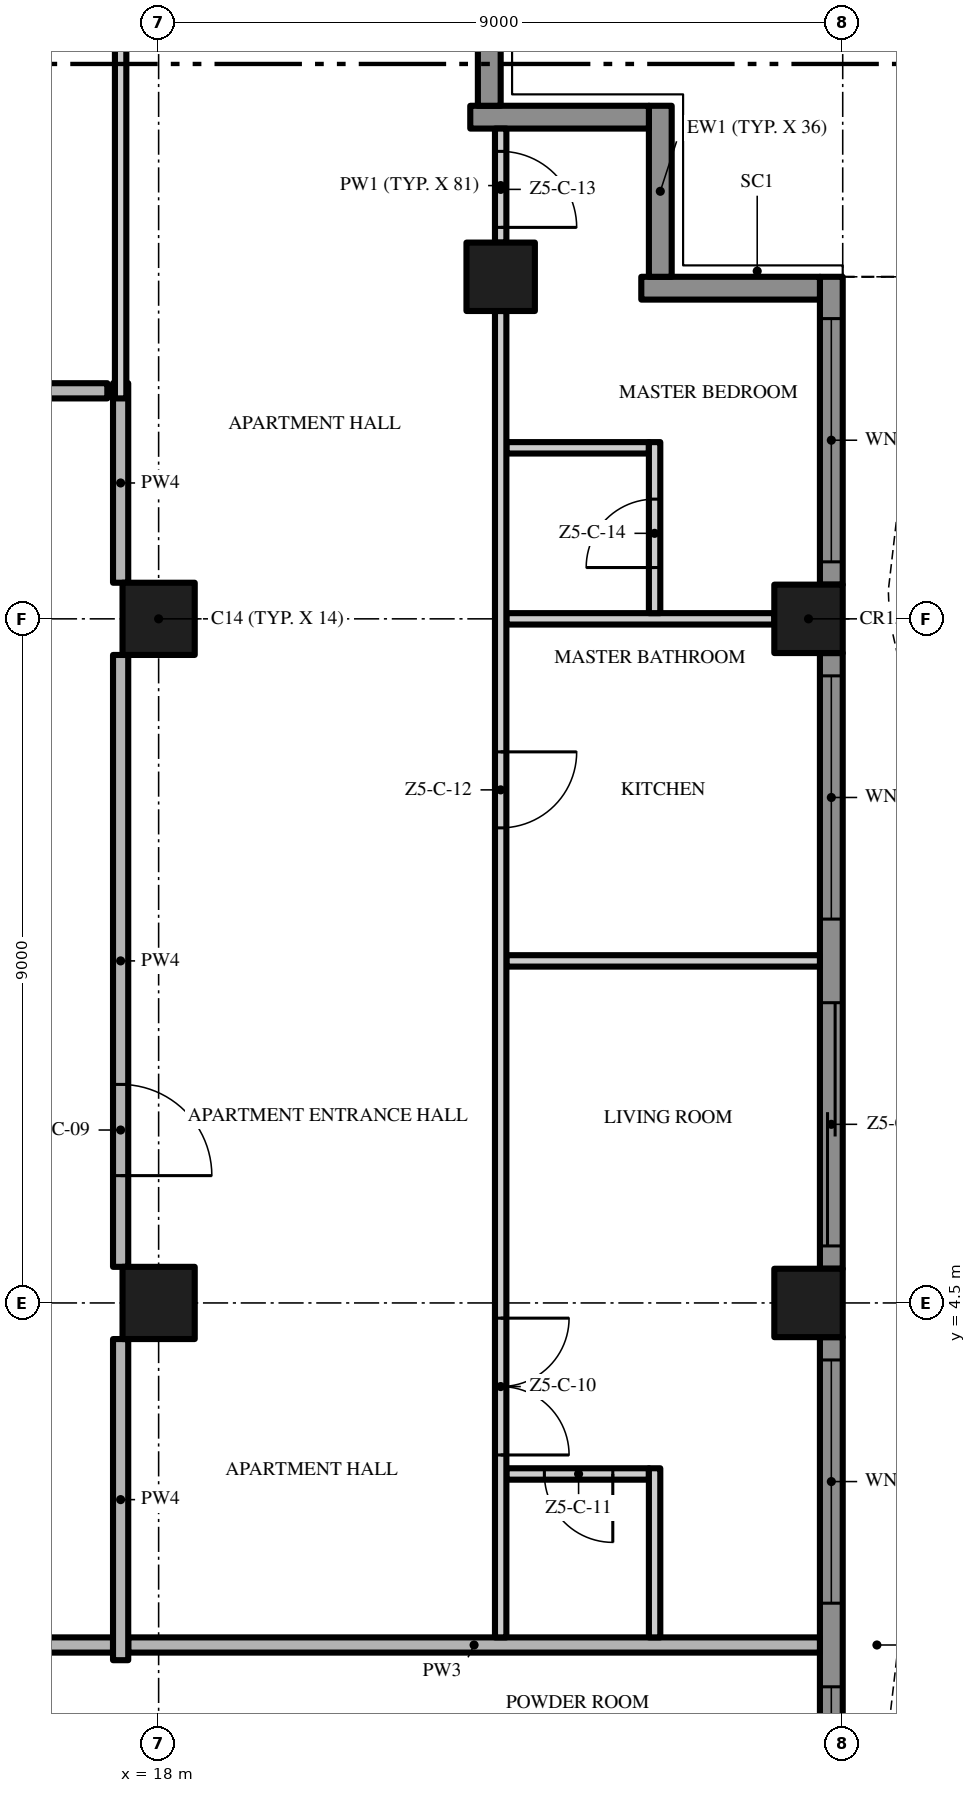
"""IFC4 building model, lengths in metres.
Left out: names, types, materials, properties, quantities, classifications, styles, units other than length and angle.
Written with IfcOpenShell. Run it as: python <this file> out.ifc"""

import sys

from ifc_helpers import new_model, si_unit, direction, frame, frame_2d, origin, origin_2d, place, context, subcontext, project, spatial, polyline, rectangle, outline, extrude, element, fill, save


model = new_model("IFC4")
c1 = context("Model", 3, precision=1e-05, world=origin(), true_north=direction((0.0, 1.0)))
c2 = subcontext(c1, "Body", "Model", "MODEL_VIEW")
j1 = project(units=[si_unit("LENGTHUNIT", "METRE"), si_unit("PLANEANGLEUNIT", "RADIAN")], contexts=[c1])
p1 = place(None, origin())
s1 = spatial("IfcSite", under=j1, at=p1, CompositionType="ELEMENT")
p2 = place(p1, origin())
s2 = spatial("IfcBuilding", under=s1, at=p2, CompositionType="ELEMENT")
p3 = place(p2, frame((0.0, 0.0, 261.6)))
s3 = spatial("IfcBuildingStorey", under=s2, at=p3, CompositionType="ELEMENT", Elevation=261.6)
for number, where, z_axis, x_axis in (
    (1, (18.0, 13.5, 0.0), (0.0, 0.0, 1.0), (1.0, 0.0, 0.0)),
    (2, (18.0, 4.5, 0.0), (0.0, 0.0, 1.0), (1.0, 0.0, 0.0)),
):
    element("IfcColumn", number, at=place(p3, frame(where, z_axis=z_axis, x_axis=x_axis)), inside=s3, PredefinedType="COLUMN", context=c2, shape_type="SweptSolid", body=[
        extrude(rectangle(XDim=0.95, YDim=0.95, at=origin_2d()), origin(), (0.0, 0.0, 1.0), 3.5),
    ])
for number, where, z_axis, x_axis in (
    (3, (26.55, 13.5, 0.0), (0.0, 0.0, 1.0), (1.0, 0.0, 0.0)),
    (4, (22.5, 18.0, 0.0), (0.0, 0.0, 1.0), (1.0, 0.0, 0.0)),
    (5, (26.55, 4.5, 0.0), (0.0, 0.0, 1.0), (1.0, 0.0, 0.0)),
):
    element("IfcColumn", number, at=place(p3, frame(where, z_axis=z_axis, x_axis=x_axis)), inside=s3, PredefinedType="COLUMN", context=c2, shape_type="SweptSolid", body=[
        extrude(rectangle(XDim=0.9, YDim=0.9, at=origin_2d()), origin(), (0.0, 0.0, 1.0), 3.5),
    ])
p4 = place(p3, frame((26.85, 4.05, 0.0), z_axis=(0.0, 0.0, 1.0), x_axis=(0.0, -1.0, 0.0)))
e6 = element("IfcWall", 6, at=p4, inside=s3, PredefinedType="SOLIDWALL", context=c2, shape_type="SweptSolid", body=[
    extrude(rectangle(XDim=8.1, YDim=0.3, at=frame_2d((4.05, 0.0))), origin(), (0.0, 0.0, 1.0), 3.5),
])
p5 = place(p4, frame((4.6, 0.0, 0.45)))
e7 = element("IfcOpeningElement", 7, at=p5, cuts=e6, PredefinedType="OPENING", context=c2, shape_type="SweptSolid", body=[
    extrude(rectangle(XDim=3.2, YDim=2.65, at=frame_2d((1.6, 1.325))), frame((0.0, 0.16, 0.0), z_axis=(0.0, -1.0, 0.0), x_axis=(1.0, 0.0, 0.0)), (0.0, 0.0, 1.0), 0.32),
])
p6 = place(p4, frame((0.3, 0.0, 0.45)))
e8 = element("IfcOpeningElement", 8, at=p6, cuts=e6, PredefinedType="OPENING", context=c2, shape_type="SweptSolid", body=[
    extrude(rectangle(XDim=3.2, YDim=2.65, at=frame_2d((1.6, 1.325))), frame((0.0, 0.16, 0.0), z_axis=(0.0, -1.0, 0.0), x_axis=(1.0, 0.0, 0.0)), (0.0, 0.0, 1.0), 0.32),
])
p7 = place(p3, frame((26.85, 13.05, 0.0), z_axis=(0.0, 0.0, 1.0), x_axis=(0.0, -1.0, 0.0)))
e9 = element("IfcWall", 9, at=p7, inside=s3, PredefinedType="SOLIDWALL", context=c2, shape_type="SweptSolid", body=[
    extrude(rectangle(XDim=8.1, YDim=0.3, at=frame_2d((4.05, 0.0))), origin(), (0.0, 0.0, 1.0), 3.5),
])
p8 = place(p7, frame((4.6, 0.0, 0.0)))
e10 = element("IfcOpeningElement", 10, at=p8, cuts=e9, PredefinedType="OPENING", context=c2, shape_type="SweptSolid", body=[
    extrude(rectangle(XDim=3.2, YDim=2.4, at=frame_2d((1.6, 1.2))), frame((0.0, 0.16, 0.0), z_axis=(0.0, -1.0, 0.0), x_axis=(1.0, 0.0, 0.0)), (0.0, 0.0, 1.0), 0.32),
])
p9 = place(p7, frame((0.3, 0.0, 0.45)))
e11 = element("IfcOpeningElement", 11, at=p9, cuts=e9, PredefinedType="OPENING", context=c2, shape_type="SweptSolid", body=[
    extrude(rectangle(XDim=3.2, YDim=2.65, at=frame_2d((1.6, 1.325))), frame((0.0, 0.16, 0.0), z_axis=(0.0, -1.0, 0.0), x_axis=(1.0, 0.0, 0.0)), (0.0, 0.0, 1.0), 0.32),
])
p10 = place(p3, frame((26.85, 18.0, 0.0), z_axis=(0.0, 0.0, 1.0), x_axis=(0.0, -1.0, 0.0)))
e12 = element("IfcWall", 12, at=p10, inside=s3, PredefinedType="SOLIDWALL", context=c2, shape_type="SweptSolid", body=[
    extrude(rectangle(XDim=4.05, YDim=0.3, at=frame_2d((2.025, 0.0))), origin(), (0.0, 0.0, 1.0), 3.5),
])
p11 = place(p10, frame((0.55, 0.0, 0.45)))
e13 = element("IfcOpeningElement", 13, at=p11, cuts=e12, PredefinedType="OPENING", context=c2, shape_type="SweptSolid", body=[
    extrude(rectangle(XDim=3.2, YDim=2.65, at=frame_2d((1.6, 1.325))), frame((0.0, 0.16, 0.0), z_axis=(0.0, -1.0, 0.0), x_axis=(1.0, 0.0, 0.0)), (0.0, 0.0, 1.0), 0.32),
])
p12 = place(p3, frame((24.35, 17.85, 0.0), z_axis=(0.0, 0.0, 1.0), x_axis=(1.0, 0.0, 0.0)))
e14 = element("IfcWall", 14, at=p12, inside=s3, PredefinedType="SOLIDWALL", context=c2, shape_type="SweptSolid", body=[
    extrude(rectangle(XDim=2.35, YDim=0.3, at=frame_2d((1.175, 0.0))), origin(), (0.0, 0.0, 1.0), 3.5),
])
p13 = place(p3, frame((24.6, 20.25, 0.0), z_axis=(0.0, 0.0, 1.0), x_axis=(0.0, -1.0, 0.0)))
e15 = element("IfcWall", 15, at=p13, inside=s3, PredefinedType="SOLIDWALL", context=c2, shape_type="SweptSolid", body=[
    extrude(rectangle(XDim=2.25, YDim=0.3, at=frame_2d((1.125, 0.0))), origin(), (0.0, 0.0, 1.0), 3.5),
])
p14 = place(p3, frame((22.1, 20.1, 0.0), z_axis=(0.0, 0.0, 1.0), x_axis=(1.0, 0.0, 0.0)))
e16 = element("IfcWall", 16, at=p14, inside=s3, PredefinedType="SOLIDWALL", context=c2, shape_type="SweptSolid", body=[
    extrude(rectangle(XDim=2.35, YDim=0.3, at=frame_2d((1.175, 0.0))), origin(), (0.0, 0.0, 1.0), 3.5),
])
p15 = place(p3, frame((22.35, 22.5, 0.0), z_axis=(0.0, 0.0, 1.0), x_axis=(0.0, -1.0, 0.0)))
e17 = element("IfcWall", 17, at=p15, inside=s3, PredefinedType="SOLIDWALL", context=c2, shape_type="SweptSolid", body=[
    extrude(rectangle(XDim=2.25, YDim=0.3, at=frame_2d((1.125, 0.0))), origin(), (0.0, 0.0, 1.0), 3.5),
])
p16 = place(p3, origin())
e18 = element("IfcWall", 18, at=p16, inside=s3, PredefinedType="USERDEFINED", context=c2, shape_type="SweptSolid", body=[
    extrude(outline(polyline([(27.951, -18.0), (27.615, -16.5), (27.6, -16.125), (27.731, -15.0), (28.255, -13.5), (28.988, -12.0), (29.649, -10.5), (29.985, -9.0), (30.0, -8.625), (29.869, -7.5), (29.345, -6.0), (28.612, -4.5), (27.951, -3.0), (27.615, -1.5), (27.6, -1.125), (27.731, 0.0), (28.255, 1.5), (28.988, 3.0), (29.649, 4.5), (29.985, 6.0), (30.0, 6.375), (29.869, 7.5), (29.345, 9.0), (28.612, 10.5), (27.951, 12.0), (27.615, 13.5), (27.6, 13.875), (27.731, 15.0), (28.255, 16.5), (28.988, 18.0), (28.763, 18.11), (28.024, 16.596), (27.486, 15.056), (27.349, 13.885), (27.366, 13.467), (27.713, 11.921), (28.385, 10.395), (29.114, 8.904), (29.624, 7.444), (29.749, 6.365), (29.736, 6.033), (29.41, 4.579), (28.761, 3.105), (28.024, 1.596), (27.486, 0.056), (27.349, -1.115), (27.366, -1.533), (27.713, -3.079), (28.385, -4.605), (29.114, -6.096), (29.624, -7.556), (29.749, -8.635), (29.736, -8.967), (29.41, -10.421), (28.761, -11.895), (28.024, -13.404), (27.486, -14.944), (27.349, -16.115), (27.366, -16.533), (27.708, -18.055), (27.951, -18.0)])), origin(), (0.0, 0.0, 1.0), 0.9),
])
p17 = place(p3, frame((17.4, 0.0, 0.0), z_axis=(0.0, 0.0, 1.0), x_axis=(-1.0, 0.0, 0.0)))
e19 = element("IfcWall", 19, at=p17, inside=s3, PredefinedType="PARTITIONING", context=c2, shape_type="SweptSolid", body=[
    extrude(rectangle(XDim=34.8, YDim=0.2, at=frame_2d((17.4, 0.0))), origin(), (0.0, 0.0, 1.0), 3.5),
])
p18 = place(p17, frame((23.4, 0.0, 0.0)))
e20 = element("IfcOpeningElement", 20, at=p18, cuts=e19, PredefinedType="OPENING", context=c2, shape_type="SweptSolid", body=[
    extrude(rectangle(XDim=1.5, YDim=2.4, at=frame_2d((0.75, 1.2))), frame((0.0, 0.11, 0.0), z_axis=(0.0, -1.0, 0.0), x_axis=(1.0, 0.0, 0.0)), (0.0, 0.0, 1.0), 0.22),
])
p19 = place(p17, frame((5.4, 0.0, 0.0)))
e21 = element("IfcOpeningElement", 21, at=p19, cuts=e19, PredefinedType="OPENING", context=c2, shape_type="SweptSolid", body=[
    extrude(rectangle(XDim=1.5, YDim=2.4, at=frame_2d((0.75, 1.2))), frame((0.0, 0.11, 0.0), z_axis=(0.0, -1.0, 0.0), x_axis=(1.0, 0.0, 0.0)), (0.0, 0.0, 1.0), 0.22),
])
p20 = place(p3, frame((17.6, 0.0, 0.0), z_axis=(0.0, 0.0, 1.0), x_axis=(1.0, 0.0, 0.0)))
e22 = element("IfcWall", 22, at=p20, inside=s3, PredefinedType="PARTITIONING", context=c2, shape_type="SweptSolid", body=[
    extrude(rectangle(XDim=9.1, YDim=0.2, at=frame_2d((4.55, 0.0))), origin(), (0.0, 0.0, 1.0), 3.5),
])
p21 = place(p3, frame((24.45, 2.25, 0.0), z_axis=(0.0, 0.0, 1.0), x_axis=(-1.0, 0.0, 0.0)))
e23 = element("IfcWall", 23, at=p21, inside=s3, PredefinedType="PARTITIONING", context=c2, shape_type="SweptSolid", body=[
    extrude(rectangle(XDim=1.875, YDim=0.15, at=frame_2d((0.938, 0.0))), origin(), (0.0, 0.0, 1.0), 3.5),
])
p22 = place(p21, frame((0.475, 0.0, 0.0)))
e24 = element("IfcOpeningElement", 24, at=p22, cuts=e23, PredefinedType="OPENING", context=c2, shape_type="SweptSolid", body=[
    extrude(rectangle(XDim=0.9, YDim=2.1, at=frame_2d((0.45, 1.05))), frame((0.0, 0.085, 0.0), z_axis=(0.0, -1.0, 0.0), x_axis=(1.0, 0.0, 0.0)), (0.0, 0.0, 1.0), 0.17),
])
p23 = place(p3, frame((22.575, 9.0, 0.0), z_axis=(0.0, 0.0, 1.0), x_axis=(1.0, 0.0, 0.0)))
e25 = element("IfcWall", 25, at=p23, inside=s3, PredefinedType="PARTITIONING", context=c2, shape_type="SweptSolid", body=[
    extrude(rectangle(XDim=4.125, YDim=0.15, at=frame_2d((2.062, 0.0))), origin(), (0.0, 0.0, 1.0), 3.5),
])
p24 = place(p3, frame((22.575, 13.5, 0.0), z_axis=(0.0, 0.0, 1.0), x_axis=(1.0, 0.0, 0.0)))
e26 = element("IfcWall", 26, at=p24, inside=s3, PredefinedType="PARTITIONING", context=c2, shape_type="SweptSolid", body=[
    extrude(rectangle(XDim=3.525, YDim=0.15, at=frame_2d((1.762, 0.0))), origin(), (0.0, 0.0, 1.0), 3.5),
])
p25 = place(p3, frame((22.575, 15.75, 0.0), z_axis=(0.0, 0.0, 1.0), x_axis=(1.0, 0.0, 0.0)))
e27 = element("IfcWall", 27, at=p25, inside=s3, PredefinedType="PARTITIONING", context=c2, shape_type="SweptSolid", body=[
    extrude(rectangle(XDim=1.875, YDim=0.15, at=frame_2d((0.938, 0.0))), origin(), (0.0, 0.0, 1.0), 3.5),
])
p26 = place(p3, frame((13.5, 16.5, 0.0), z_axis=(0.0, 0.0, 1.0), x_axis=(1.0, 0.0, 0.0)))
e28 = element("IfcWall", 28, at=p26, inside=s3, PredefinedType="PARTITIONING", context=c2, shape_type="SweptSolid", body=[
    extrude(rectangle(XDim=3.825, YDim=0.2, at=frame_2d((1.913, 0.0))), origin(), (0.0, 0.0, 1.0), 3.5),
])
p27 = place(p26, frame((1.55, 0.0, 0.0)))
e29 = element("IfcOpeningElement", 29, at=p27, cuts=e28, PredefinedType="OPENING", context=c2, shape_type="SweptSolid", body=[
    extrude(rectangle(XDim=0.9, YDim=2.1, at=frame_2d((0.45, 1.05))), frame((0.0, 0.11, 0.0), z_axis=(0.0, -1.0, 0.0), x_axis=(1.0, 0.0, 0.0)), (0.0, 0.0, 1.0), 0.22),
])
p28 = place(p3, frame((17.5, -0.2, 0.0), z_axis=(0.0, 0.0, 1.0), x_axis=(0.0, 1.0, 0.0)))
e30 = element("IfcWall", 30, at=p28, inside=s3, PredefinedType="PARTITIONING", context=c2, shape_type="SweptSolid", body=[
    extrude(rectangle(XDim=4.225, YDim=0.2, at=frame_2d((2.112, 0.0))), origin(), (0.0, 0.0, 1.0), 3.5),
])
p29 = place(p3, frame((17.5, 13.025, 0.0), z_axis=(0.0, 0.0, 1.0), x_axis=(0.0, -1.0, 0.0)))
e31 = element("IfcWall", 31, at=p29, inside=s3, PredefinedType="PARTITIONING", context=c2, shape_type="SweptSolid", body=[
    extrude(rectangle(XDim=8.05, YDim=0.2, at=frame_2d((4.025, 0.0))), origin(), (0.0, 0.0, 1.0), 3.5),
])
p30 = place(p29, frame((5.65, 0.0, 0.0)))
e32 = element("IfcOpeningElement", 32, at=p30, cuts=e31, PredefinedType="OPENING", context=c2, shape_type="SweptSolid", body=[
    extrude(rectangle(XDim=1.2, YDim=2.4, at=frame_2d((0.6, 1.2))), frame((0.0, 0.11, 0.0), z_axis=(0.0, -1.0, 0.0), x_axis=(1.0, 0.0, 0.0)), (0.0, 0.0, 1.0), 0.22),
])
p31 = place(p3, frame((17.5, 13.975, 0.0), z_axis=(0.0, 0.0, 1.0), x_axis=(0.0, 1.0, 0.0)))
e33 = element("IfcWall", 33, at=p31, inside=s3, PredefinedType="PARTITIONING", context=c2, shape_type="SweptSolid", body=[
    extrude(rectangle(XDim=2.625, YDim=0.2, at=frame_2d((1.312, 0.0))), origin(), (0.0, 0.0, 1.0), 3.5),
])
p32 = place(p3, frame((17.5, 16.4, 0.0), z_axis=(0.0, 0.0, 1.0), x_axis=(0.0, 1.0, 0.0)))
e34 = element("IfcWall", 34, at=p32, inside=s3, PredefinedType="PARTITIONING", context=c2, shape_type="SweptSolid", body=[
    extrude(rectangle(XDim=5.2, YDim=0.15, at=frame_2d((2.6, 0.0))), origin(), (0.0, 0.0, 1.0), 3.5),
])
p33 = place(p3, frame((22.5, 17.55, 0.0), z_axis=(0.0, 0.0, 1.0), x_axis=(0.0, -1.0, 0.0)))
e35 = element("IfcWall", 35, at=p33, inside=s3, PredefinedType="PARTITIONING", context=c2, shape_type="SweptSolid", body=[
    extrude(rectangle(XDim=17.45, YDim=0.15, at=frame_2d((8.725, 0.0))), origin(), (0.0, 0.0, 1.0), 3.5),
])
p34 = place(p33, frame((13.25, 0.0, 0.0)))
e36 = element("IfcOpeningElement", 36, at=p34, cuts=e35, PredefinedType="OPENING", context=c2, shape_type="SweptSolid", body=[
    extrude(rectangle(XDim=1.8, YDim=2.4, at=frame_2d((0.9, 1.2))), frame((0.0, 0.085, 0.0), z_axis=(0.0, -1.0, 0.0), x_axis=(1.0, 0.0, 0.0)), (0.0, 0.0, 1.0), 0.17),
])
p35 = place(p33, frame((5.8, 0.0, 0.0)))
e37 = element("IfcOpeningElement", 37, at=p35, cuts=e35, PredefinedType="OPENING", context=c2, shape_type="SweptSolid", body=[
    extrude(rectangle(XDim=1.0, YDim=2.4, at=frame_2d((0.5, 1.2))), frame((0.0, 0.085, 0.0), z_axis=(0.0, -1.0, 0.0), x_axis=(1.0, 0.0, 0.0)), (0.0, 0.0, 1.0), 0.17),
])
p36 = place(p3, frame((22.5, 19.95, 0.0), z_axis=(0.0, 0.0, 1.0), x_axis=(0.0, -1.0, 0.0)))
e38 = element("IfcWall", 38, at=p36, inside=s3, PredefinedType="PARTITIONING", context=c2, shape_type="SweptSolid", body=[
    extrude(rectangle(XDim=1.5, YDim=0.15, at=frame_2d((0.75, 0.0))), origin(), (0.0, 0.0, 1.0), 3.5),
])
p37 = place(p36, frame((0.3, 0.0, 0.0)))
e39 = element("IfcOpeningElement", 39, at=p37, cuts=e38, PredefinedType="OPENING", context=c2, shape_type="SweptSolid", body=[
    extrude(rectangle(XDim=1.0, YDim=2.4, at=frame_2d((0.5, 1.2))), frame((0.0, 0.085, 0.0), z_axis=(0.0, -1.0, 0.0), x_axis=(1.0, 0.0, 0.0)), (0.0, 0.0, 1.0), 0.17),
])
p38 = place(p3, frame((24.525, 0.1, 0.0), z_axis=(0.0, 0.0, 1.0), x_axis=(0.0, 1.0, 0.0)))
e40 = element("IfcWall", 40, at=p38, inside=s3, PredefinedType="PARTITIONING", context=c2, shape_type="SweptSolid", body=[
    extrude(rectangle(XDim=2.225, YDim=0.15, at=frame_2d((1.113, 0.0))), origin(), (0.0, 0.0, 1.0), 3.5),
])
p39 = place(p3, frame((24.525, 13.575, 0.0), z_axis=(0.0, 0.0, 1.0), x_axis=(0.0, 1.0, 0.0)))
e41 = element("IfcWall", 41, at=p39, inside=s3, PredefinedType="PARTITIONING", context=c2, shape_type="SweptSolid", body=[
    extrude(rectangle(XDim=2.25, YDim=0.15, at=frame_2d((1.125, 0.0))), origin(), (0.0, 0.0, 1.0), 3.5),
])
p40 = place(p39, frame((0.6, 0.0, 0.0)))
e42 = element("IfcOpeningElement", 42, at=p40, cuts=e41, PredefinedType="OPENING", context=c2, shape_type="SweptSolid", body=[
    extrude(rectangle(XDim=0.9, YDim=2.1, at=frame_2d((0.45, 1.05))), frame((0.0, 0.085, 0.0), z_axis=(0.0, -1.0, 0.0), x_axis=(1.0, 0.0, 0.0)), (0.0, 0.0, 1.0), 0.17),
])
p41 = place(p5, origin())
e43 = element("IfcWindow", 43, at=p41, inside=s3, PartitioningType="SINGLE_PANEL", PredefinedType="WINDOW", context=c2, shape_type="SweptSolid", body=[
    extrude(rectangle(XDim=3.2, YDim=2.65, at=frame_2d((1.6, 1.325))), frame((0.0, 0.03, 0.0), z_axis=(0.0, -1.0, 0.0), x_axis=(1.0, 0.0, 0.0)), (0.0, 0.0, 1.0), 0.06),
])
fill(e7, e43)
p42 = place(p6, origin())
e44 = element("IfcWindow", 44, at=p42, inside=s3, PartitioningType="SINGLE_PANEL", PredefinedType="WINDOW", context=c2, shape_type="SweptSolid", body=[
    extrude(rectangle(XDim=3.2, YDim=2.65, at=frame_2d((1.6, 1.325))), frame((0.0, 0.03, 0.0), z_axis=(0.0, -1.0, 0.0), x_axis=(1.0, 0.0, 0.0)), (0.0, 0.0, 1.0), 0.06),
])
fill(e8, e44)
p43 = place(p8, origin())
e45 = element("IfcDoor", 45, at=p43, inside=s3, OperationType="SINGLE_SWING_LEFT", PredefinedType="DOOR", context=c2, shape_type="SweptSolid", body=[
    extrude(rectangle(XDim=3.2, YDim=2.4, at=frame_2d((1.6, 1.2))), frame((0.0, 0.025, 0.0), z_axis=(0.0, -1.0, 0.0), x_axis=(1.0, 0.0, 0.0)), (0.0, 0.0, 1.0), 0.05),
])
fill(e10, e45)
p44 = place(p9, origin())
e46 = element("IfcWindow", 46, at=p44, inside=s3, PartitioningType="SINGLE_PANEL", PredefinedType="WINDOW", context=c2, shape_type="SweptSolid", body=[
    extrude(rectangle(XDim=3.2, YDim=2.65, at=frame_2d((1.6, 1.325))), frame((0.0, 0.03, 0.0), z_axis=(0.0, -1.0, 0.0), x_axis=(1.0, 0.0, 0.0)), (0.0, 0.0, 1.0), 0.06),
])
fill(e11, e46)
p45 = place(p11, origin())
e47 = element("IfcWindow", 47, at=p45, inside=s3, PartitioningType="SINGLE_PANEL", PredefinedType="WINDOW", context=c2, shape_type="SweptSolid", body=[
    extrude(rectangle(XDim=3.2, YDim=2.65, at=frame_2d((1.6, 1.325))), frame((0.0, 0.03, 0.0), z_axis=(0.0, -1.0, 0.0), x_axis=(1.0, 0.0, 0.0)), (0.0, 0.0, 1.0), 0.06),
])
fill(e13, e47)
p46 = place(p30, origin())
e48 = element("IfcDoor", 48, at=p46, inside=s3, OperationType="SINGLE_SWING_RIGHT", PredefinedType="DOOR", context=c2, shape_type="SweptSolid", body=[
    extrude(rectangle(XDim=1.2, YDim=2.4, at=frame_2d((0.6, 1.2))), frame((0.0, 0.025, 0.0), z_axis=(0.0, -1.0, 0.0), x_axis=(1.0, 0.0, 0.0)), (0.0, 0.0, 1.0), 0.05),
])
fill(e32, e48)
p47 = place(p34, origin())
e49 = element("IfcDoor", 49, at=p47, inside=s3, OperationType="DOUBLE_DOOR_SINGLE_SWING", PredefinedType="DOOR", context=c2, shape_type="SweptSolid", body=[
    extrude(rectangle(XDim=1.8, YDim=2.4, at=frame_2d((0.9, 1.2))), frame((0.0, 0.025, 0.0), z_axis=(0.0, -1.0, 0.0), x_axis=(1.0, 0.0, 0.0)), (0.0, 0.0, 1.0), 0.05),
])
fill(e36, e49)
p48 = place(p22, origin())
e50 = element("IfcDoor", 50, at=p48, inside=s3, OperationType="SINGLE_SWING_LEFT", PredefinedType="DOOR", context=c2, shape_type="SweptSolid", body=[
    extrude(rectangle(XDim=0.9, YDim=2.1, at=frame_2d((0.45, 1.05))), frame((0.0, 0.025, 0.0), z_axis=(0.0, -1.0, 0.0), x_axis=(1.0, 0.0, 0.0)), (0.0, 0.0, 1.0), 0.05),
])
fill(e24, e50)
p49 = place(p35, origin())
e51 = element("IfcDoor", 51, at=p49, inside=s3, OperationType="SINGLE_SWING_LEFT", PredefinedType="DOOR", context=c2, shape_type="SweptSolid", body=[
    extrude(rectangle(XDim=1.0, YDim=2.4, at=frame_2d((0.5, 1.2))), frame((0.0, 0.025, 0.0), z_axis=(0.0, -1.0, 0.0), x_axis=(1.0, 0.0, 0.0)), (0.0, 0.0, 1.0), 0.05),
])
fill(e37, e51)
p50 = place(p37, origin())
e52 = element("IfcDoor", 52, at=p50, inside=s3, OperationType="SINGLE_SWING_RIGHT", PredefinedType="DOOR", context=c2, shape_type="SweptSolid", body=[
    extrude(rectangle(XDim=1.0, YDim=2.4, at=frame_2d((0.5, 1.2))), frame((0.0, 0.025, 0.0), z_axis=(0.0, -1.0, 0.0), x_axis=(1.0, 0.0, 0.0)), (0.0, 0.0, 1.0), 0.05),
])
fill(e39, e52)
p51 = place(p40, origin())
e53 = element("IfcDoor", 53, at=p51, inside=s3, OperationType="SINGLE_SWING_LEFT", PredefinedType="DOOR", context=c2, shape_type="SweptSolid", body=[
    extrude(rectangle(XDim=0.9, YDim=2.1, at=frame_2d((0.45, 1.05))), frame((0.0, 0.025, 0.0), z_axis=(0.0, -1.0, 0.0), x_axis=(1.0, 0.0, 0.0)), (0.0, 0.0, 1.0), 0.05),
])
fill(e42, e53)
save(model, sys.argv[1])
